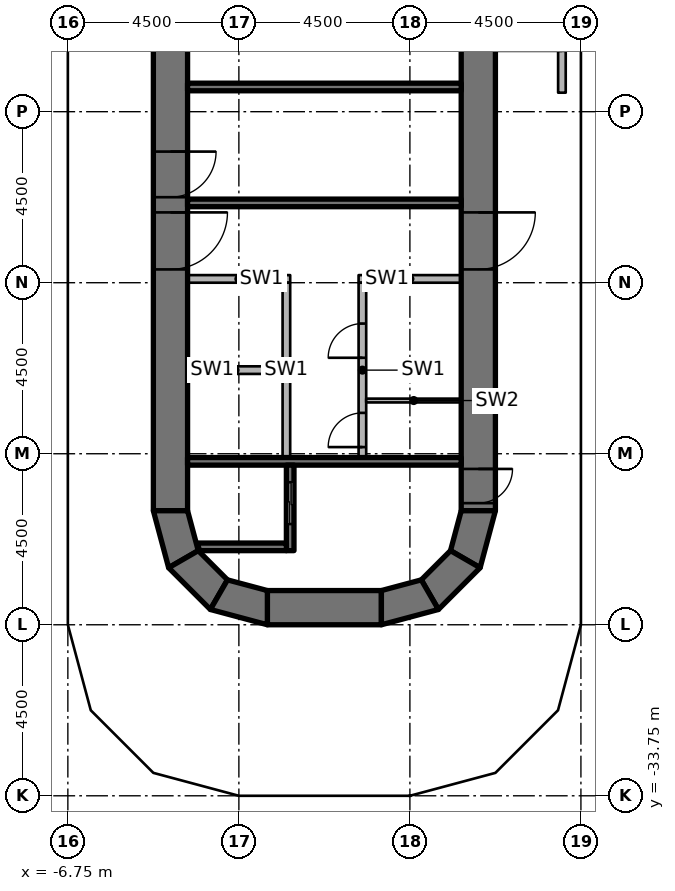
"""IFC4 building model, lengths in metres.
Left out: names, types, materials, properties, quantities, classifications, styles, units other than length and angle.
Written with IfcOpenShell. Run it as: python <this file> out.ifc"""

import sys

from ifc_helpers import new_model, si_unit, direction, frame, frame_2d, origin, origin_2d, place, context, subcontext, project, spatial, polyline, rectangle, outline, extrude, element, fill, save


model = new_model("IFC4")
c1 = context("Model", 3, precision=1e-05, world=origin(), true_north=direction((0.0, 1.0)))
c2 = subcontext(c1, "Body", "Model", "MODEL_VIEW")
j1 = project(units=[si_unit("LENGTHUNIT", "METRE"), si_unit("PLANEANGLEUNIT", "RADIAN")], contexts=[c1])
p1 = place(None, origin())
s1 = spatial("IfcSite", under=j1, at=p1, CompositionType="ELEMENT")
p2 = place(p1, origin())
s2 = spatial("IfcBuilding", under=s1, at=p2, CompositionType="ELEMENT")
p3 = place(p2, frame((0.0, 0.0, 27.0)))
s3 = spatial("IfcBuildingStorey", under=s2, at=p3, CompositionType="ELEMENT", Elevation=27.0)
for number, where, z_axis, x_axis in (
    (1, (-6.25, -26.9, 0.0), (0.0, 0.0, 1.0), (1.0, 0.0, 0.0)),
    (2, (-6.25, -24.65, 0.0), (0.0, 0.0, 1.0), (1.0, 0.0, 0.0)),
    (3, (-6.25, -20.25, 0.0), (0.0, 0.0, 1.0), (1.0, 0.0, 0.0)),
    (4, (-6.25, -15.75, 0.0), (0.0, 0.0, 1.0), (1.0, 0.0, 0.0)),
    (5, (-2.25, -33.11, 0.0), (0.0, 0.0, 1.0), (1.0, 0.0, 0.0)),
    (6, (2.25, -33.11, 0.0), (0.0, 0.0, 1.0), (1.0, 0.0, 0.0)),
    (7, (6.25, -26.9, 0.0), (0.0, 0.0, 1.0), (1.0, 0.0, 0.0)),
    (8, (6.25, -24.65, 0.0), (0.0, 0.0, 1.0), (1.0, 0.0, 0.0)),
    (9, (6.25, -20.25, 0.0), (0.0, 0.0, 1.0), (1.0, 0.0, 0.0)),
    (10, (6.25, -15.75, 0.0), (0.0, 0.0, 1.0), (1.0, 0.0, 0.0)),
):
    element("IfcColumn", number, at=place(p3, frame(where, z_axis=z_axis, x_axis=x_axis)), inside=s3, PredefinedType="COLUMN", context=c2, shape_type="SweptSolid", body=[
        extrude(rectangle(XDim=1.0, YDim=1.0, at=origin_2d()), origin(), (0.0, 0.0, 1.0), 4.05),
    ])
p4 = place(p3, frame((-4.05, -11.25, 0.0), z_axis=(0.0, 0.0, 1.0), x_axis=(0.0, -1.0, 0.0)))
e11 = element("IfcWall", 11, at=p4, inside=s3, PredefinedType="SHEAR", context=c2, shape_type="SweptSolid", body=[
    extrude(rectangle(XDim=15.0, YDim=0.9, at=frame_2d((7.5, 0.0))), origin(), (0.0, 0.0, 1.0), 4.2),
])
p5 = place(p4, frame((7.15, 0.0, 0.0)))
e12 = element("IfcOpeningElement", 12, at=p5, cuts=e11, PredefinedType="OPENING", context=c2, shape_type="SweptSolid", body=[
    extrude(rectangle(XDim=1.5, YDim=2.3, at=frame_2d((0.75, 1.15))), frame((0.0, 0.46, 0.0), z_axis=(0.0, -1.0, 0.0), x_axis=(1.0, 0.0, 0.0)), (0.0, 0.0, 1.0), 0.92),
])
p6 = place(p4, frame((5.55, 0.0, 0.0)))
e13 = element("IfcOpeningElement", 13, at=p6, cuts=e11, PredefinedType="OPENING", context=c2, shape_type="SweptSolid", body=[
    extrude(rectangle(XDim=1.2, YDim=2.1, at=frame_2d((0.6, 1.05))), frame((0.0, 0.46, 0.0), z_axis=(0.0, -1.0, 0.0), x_axis=(1.0, 0.0, 0.0)), (0.0, 0.0, 1.0), 0.92),
])
p7 = place(p3, frame((4.05, -11.25, 0.0), z_axis=(0.0, 0.0, 1.0), x_axis=(0.0, -1.0, 0.0)))
e14 = element("IfcWall", 14, at=p7, inside=s3, PredefinedType="SHEAR", context=c2, shape_type="SweptSolid", body=[
    extrude(rectangle(XDim=15.0, YDim=0.9, at=frame_2d((7.5, 0.0))), origin(), (0.0, 0.0, 1.0), 4.2),
])
p8 = place(p7, frame((7.15, 0.0, 0.0)))
e15 = element("IfcOpeningElement", 15, at=p8, cuts=e14, PredefinedType="OPENING", context=c2, shape_type="SweptSolid", body=[
    extrude(rectangle(XDim=1.5, YDim=2.3, at=frame_2d((0.75, 1.15))), frame((0.0, 0.46, 0.0), z_axis=(0.0, -1.0, 0.0), x_axis=(1.0, 0.0, 0.0)), (0.0, 0.0, 1.0), 0.92),
])
p9 = place(p7, frame((13.9, 0.0, 0.0)))
e16 = element("IfcOpeningElement", 16, at=p9, cuts=e14, PredefinedType="OPENING", context=c2, shape_type="SweptSolid", body=[
    extrude(rectangle(XDim=0.9, YDim=2.1, at=frame_2d((0.45, 1.05))), frame((0.0, 0.46, 0.0), z_axis=(0.0, -1.0, 0.0), x_axis=(1.0, 0.0, 0.0)), (0.0, 0.0, 1.0), 0.92),
])
p10 = place(p7, frame((1.15, 0.0, 0.0)))
e17 = element("IfcOpeningElement", 17, at=p10, cuts=e14, PredefinedType="OPENING", context=c2, shape_type="SweptSolid", body=[
    extrude(rectangle(XDim=1.2, YDim=2.1, at=frame_2d((0.6, 1.05))), frame((0.0, 0.46, 0.0), z_axis=(0.0, -1.0, 0.0), x_axis=(1.0, 0.0, 0.0)), (0.0, 0.0, 1.0), 0.92),
])
p11 = place(p3, frame((-1.5, -28.8, 0.0), z_axis=(0.0, 0.0, 1.0), x_axis=(1.0, 0.0, 0.0)))
e18 = element("IfcWall", 18, at=p11, inside=s3, PredefinedType="SHEAR", context=c2, shape_type="SweptSolid", body=[
    extrude(rectangle(XDim=3.0, YDim=0.9, at=frame_2d((1.5, 0.0))), origin(), (0.0, 0.0, 1.0), 4.2),
])
p12 = place(p3, origin())
e19 = element("IfcWall", 19, at=p12, inside=s3, PredefinedType="SHEAR", context=c2, shape_type="SweptSolid", body=[
    extrude(outline(polyline([(-4.5, -26.25), (-4.098, -27.75), (-3.319, -27.3), (-3.6, -26.25), (-4.5, -26.25)])), origin(), (0.0, 0.0, 1.0), 4.2),
])
p13 = place(p3, origin())
e20 = element("IfcWall", 20, at=p13, inside=s3, PredefinedType="SHEAR", context=c2, shape_type="SweptSolid", body=[
    extrude(outline(polyline([(-4.098, -27.75), (-3.0, -28.848), (-2.55, -28.069), (-3.319, -27.3), (-4.098, -27.75)])), origin(), (0.0, 0.0, 1.0), 4.2),
])
p14 = place(p3, origin())
e21 = element("IfcWall", 21, at=p14, inside=s3, PredefinedType="SHEAR", context=c2, shape_type="SweptSolid", body=[
    extrude(outline(polyline([(-3.0, -28.848), (-1.5, -29.25), (-1.5, -28.35), (-2.55, -28.069), (-3.0, -28.848)])), origin(), (0.0, 0.0, 1.0), 4.2),
])
p15 = place(p3, origin())
e22 = element("IfcWall", 22, at=p15, inside=s3, PredefinedType="SHEAR", context=c2, shape_type="SweptSolid", body=[
    extrude(outline(polyline([(4.5, -26.25), (4.098, -27.75), (3.319, -27.3), (3.6, -26.25), (4.5, -26.25)])), origin(), (0.0, 0.0, 1.0), 4.2),
])
p16 = place(p3, origin())
e23 = element("IfcWall", 23, at=p16, inside=s3, PredefinedType="SHEAR", context=c2, shape_type="SweptSolid", body=[
    extrude(outline(polyline([(4.098, -27.75), (3.0, -28.848), (2.55, -28.069), (3.319, -27.3), (4.098, -27.75)])), origin(), (0.0, 0.0, 1.0), 4.2),
])
p17 = place(p3, origin())
e24 = element("IfcWall", 24, at=p17, inside=s3, PredefinedType="SHEAR", context=c2, shape_type="SweptSolid", body=[
    extrude(outline(polyline([(3.0, -28.848), (1.5, -29.25), (1.5, -28.35), (2.55, -28.069), (3.0, -28.848)])), origin(), (0.0, 0.0, 1.0), 4.2),
])
p18 = place(p3, frame((6.25, -15.25, 0.0), z_axis=(0.0, 0.0, 1.0), x_axis=(0.0, 1.0, 0.0)))
e25 = element("IfcWall", 25, at=p18, inside=s3, PredefinedType="SOLIDWALL", context=c2, shape_type="SweptSolid", body=[
    extrude(rectangle(XDim=4.0, YDim=0.2, at=frame_2d((2.0, 0.0))), origin(), (0.0, 0.0, 1.0), 3.15),
])
p19 = place(p18, frame((1.1, 0.0, 0.0)))
e26 = element("IfcOpeningElement", 26, at=p19, cuts=e25, PredefinedType="OPENING", context=c2, shape_type="SweptSolid", body=[
    extrude(rectangle(XDim=1.8, YDim=2.4, at=frame_2d((0.9, 1.2))), frame((0.0, 0.11, 0.0), z_axis=(0.0, -1.0, 0.0), x_axis=(1.0, 0.0, 0.0)), (0.0, 0.0, 1.0), 0.22),
])
p20 = place(p3, frame((3.6, -24.95, 0.0), z_axis=(0.0, 0.0, 1.0), x_axis=(-1.0, 0.0, 0.0)))
e27 = element("IfcWall", 27, at=p20, inside=s3, PredefinedType="SHEAR", context=c2, shape_type="SweptSolid", body=[
    extrude(rectangle(XDim=7.2, YDim=0.2, at=frame_2d((3.6, 0.0))), origin(), (0.0, 0.0, 1.0), 4.05),
])
p21 = place(p3, frame((-0.9, -27.3, 0.0), z_axis=(0.0, 0.0, 1.0), x_axis=(0.0, 1.0, 0.0)))
e28 = element("IfcWall", 28, at=p21, inside=s3, PredefinedType="SHEAR", context=c2, shape_type="SweptSolid", body=[
    extrude(rectangle(XDim=2.25, YDim=0.2, at=frame_2d((1.125, 0.0))), origin(), (0.0, 0.0, 1.0), 4.05),
])
p22 = place(p21, frame((0.7, 0.0, 0.0)))
e29 = element("IfcOpeningElement", 29, at=p22, cuts=e28, PredefinedType="OPENING", context=c2, shape_type="SweptSolid", body=[
    extrude(rectangle(XDim=1.1, YDim=2.3, at=frame_2d((0.55, 1.15))), frame((0.0, 0.11, 0.0), z_axis=(0.0, -1.0, 0.0), x_axis=(1.0, 0.0, 0.0)), (0.0, 0.0, 1.0), 0.22),
])
p23 = place(p3, origin())
e30 = element("IfcWall", 30, at=p23, inside=s3, PredefinedType="SHEAR", context=c2, shape_type="SweptSolid", body=[
    extrude(outline(polyline([(-1.0, -27.1), (-3.341, -27.1), (-3.291, -27.284), (-3.275, -27.3), (-1.0, -27.3), (-1.0, -27.1)])), origin(), (0.0, 0.0, 1.0), 4.05),
])
for number, where, z_axis, x_axis in (
    (31, (3.6, -18.15, 0.0), (0.0, 0.0, 1.0), (-1.0, 0.0, 0.0)),
    (32, (3.6, -15.1, 0.0), (0.0, 0.0, 1.0), (-1.0, 0.0, 0.0)),
):
    element("IfcWall", number, at=place(p3, frame(where, z_axis=z_axis, x_axis=x_axis)), inside=s3, PredefinedType="SHEAR", context=c2, shape_type="SweptSolid", body=[
        extrude(rectangle(XDim=7.2, YDim=0.2, at=frame_2d((3.6, 0.0))), origin(), (0.0, 0.0, 1.0), 4.05),
    ])
p24 = place(p3, frame((3.6, -20.15, 0.0), z_axis=(0.0, 0.0, 1.0), x_axis=(-1.0, 0.0, 0.0)))
e33 = element("IfcWall", 33, at=p24, inside=s3, PredefinedType="PARTITIONING", context=c2, shape_type="SweptSolid", body=[
    extrude(rectangle(XDim=2.7, YDim=0.2, at=frame_2d((1.35, 0.0))), origin(), (0.0, 0.0, 1.0), 4.05),
])
p25 = place(p3, frame((1.0, -24.85, 0.0), z_axis=(0.0, 0.0, 1.0), x_axis=(0.0, 1.0, 0.0)))
e34 = element("IfcWall", 34, at=p25, inside=s3, PredefinedType="PARTITIONING", context=c2, shape_type="SweptSolid", body=[
    extrude(rectangle(XDim=4.6, YDim=0.2, at=frame_2d((2.3, 0.0))), origin(), (0.0, 0.0, 1.0), 4.05),
])
p26 = place(p25, frame((0.275, 0.0, 0.0)))
e35 = element("IfcOpeningElement", 35, at=p26, cuts=e34, PredefinedType="OPENING", context=c2, shape_type="SweptSolid", body=[
    extrude(rectangle(XDim=0.9, YDim=2.1, at=frame_2d((0.45, 1.05))), frame((0.0, 0.11, 0.0), z_axis=(0.0, -1.0, 0.0), x_axis=(1.0, 0.0, 0.0)), (0.0, 0.0, 1.0), 0.22),
])
p27 = place(p25, frame((2.625, 0.0, 0.0)))
e36 = element("IfcOpeningElement", 36, at=p27, cuts=e34, PredefinedType="OPENING", context=c2, shape_type="SweptSolid", body=[
    extrude(rectangle(XDim=0.9, YDim=2.1, at=frame_2d((0.45, 1.05))), frame((0.0, 0.11, 0.0), z_axis=(0.0, -1.0, 0.0), x_axis=(1.0, 0.0, 0.0)), (0.0, 0.0, 1.0), 0.22),
])
p28 = place(p3, frame((-0.9, -20.15, 0.0), z_axis=(0.0, 0.0, 1.0), x_axis=(-1.0, 0.0, 0.0)))
e37 = element("IfcWall", 37, at=p28, inside=s3, PredefinedType="PARTITIONING", context=c2, shape_type="SweptSolid", body=[
    extrude(rectangle(XDim=2.7, YDim=0.2, at=frame_2d((1.35, 0.0))), origin(), (0.0, 0.0, 1.0), 4.05),
])
p29 = place(p3, frame((-1.0, -24.85, 0.0), z_axis=(0.0, 0.0, 1.0), x_axis=(0.0, 1.0, 0.0)))
e38 = element("IfcWall", 38, at=p29, inside=s3, PredefinedType="PARTITIONING", context=c2, shape_type="SweptSolid", body=[
    extrude(rectangle(XDim=4.6, YDim=0.2, at=frame_2d((2.3, 0.0))), origin(), (0.0, 0.0, 1.0), 4.05),
])
p30 = place(p3, frame((3.6, -23.35, 0.0), z_axis=(0.0, 0.0, 1.0), x_axis=(-1.0, 0.0, 0.0)))
e39 = element("IfcWall", 39, at=p30, inside=s3, PredefinedType="PARTITIONING", context=c2, shape_type="SweptSolid", body=[
    extrude(rectangle(XDim=2.5, YDim=0.1, at=frame_2d((1.25, 0.0))), origin(), (0.0, 0.0, 1.0), 4.05),
])
p31 = place(p3, frame((-1.1, -22.55, 0.0), z_axis=(0.0, 0.0, 1.0), x_axis=(-1.0, 0.0, 0.0)))
e40 = element("IfcWall", 40, at=p31, inside=s3, PredefinedType="PARTITIONING", context=c2, shape_type="SweptSolid", body=[
    extrude(rectangle(XDim=2.5, YDim=0.2, at=frame_2d((1.25, 0.0))), origin(), (0.0, 0.0, 1.0), 4.05),
])
p32 = place(p8, origin())
e41 = element("IfcDoor", 41, at=p32, inside=s3, OperationType="DOUBLE_DOOR_SINGLE_SWING", PredefinedType="DOOR", context=c2, shape_type="SweptSolid", body=[
    extrude(rectangle(XDim=1.5, YDim=2.3, at=frame_2d((0.75, 1.15))), frame((0.0, 0.025, 0.0), z_axis=(0.0, -1.0, 0.0), x_axis=(1.0, 0.0, 0.0)), (0.0, 0.0, 1.0), 0.05),
])
fill(e15, e41)
p33 = place(p5, origin())
e42 = element("IfcDoor", 42, at=p33, inside=s3, OperationType="DOUBLE_DOOR_SINGLE_SWING", PredefinedType="DOOR", context=c2, shape_type="SweptSolid", body=[
    extrude(rectangle(XDim=1.5, YDim=2.3, at=frame_2d((0.75, 1.15))), frame((0.0, 0.025, 0.0), z_axis=(0.0, -1.0, 0.0), x_axis=(1.0, 0.0, 0.0)), (0.0, 0.0, 1.0), 0.05),
])
fill(e12, e42)
p34 = place(p9, origin())
e43 = element("IfcDoor", 43, at=p34, inside=s3, OperationType="SINGLE_SWING_LEFT", PredefinedType="DOOR", context=c2, shape_type="SweptSolid", body=[
    extrude(rectangle(XDim=0.9, YDim=2.1, at=frame_2d((0.45, 1.05))), frame((0.0, 0.025, 0.0), z_axis=(0.0, -1.0, 0.0), x_axis=(1.0, 0.0, 0.0)), (0.0, 0.0, 1.0), 0.05),
])
fill(e16, e43)
p35 = place(p6, origin())
e44 = element("IfcDoor", 44, at=p35, inside=s3, OperationType="SINGLE_SWING_RIGHT", PredefinedType="DOOR", context=c2, shape_type="SweptSolid", body=[
    extrude(rectangle(XDim=1.2, YDim=2.1, at=frame_2d((0.6, 1.05))), frame((0.0, 0.025, 0.0), z_axis=(0.0, -1.0, 0.0), x_axis=(1.0, 0.0, 0.0)), (0.0, 0.0, 1.0), 0.05),
])
fill(e13, e44)
p36 = place(p22, origin())
e45 = element("IfcDoor", 45, at=p36, inside=s3, OperationType="DOUBLE_DOOR_SLIDING", PredefinedType="DOOR", context=c2, shape_type="SweptSolid", body=[
    extrude(rectangle(XDim=1.1, YDim=2.3, at=frame_2d((0.55, 1.15))), frame((0.0, 0.025, 0.0), z_axis=(0.0, -1.0, 0.0), x_axis=(1.0, 0.0, 0.0)), (0.0, 0.0, 1.0), 0.05),
])
fill(e29, e45)
p37 = place(p26, origin())
e46 = element("IfcDoor", 46, at=p37, inside=s3, OperationType="SINGLE_SWING_LEFT", PredefinedType="DOOR", context=c2, shape_type="SweptSolid", body=[
    extrude(rectangle(XDim=0.9, YDim=2.1, at=frame_2d((0.45, 1.05))), frame((0.0, 0.025, 0.0), z_axis=(0.0, -1.0, 0.0), x_axis=(1.0, 0.0, 0.0)), (0.0, 0.0, 1.0), 0.05),
])
fill(e35, e46)
p38 = place(p27, origin())
e47 = element("IfcDoor", 47, at=p38, inside=s3, OperationType="SINGLE_SWING_LEFT", PredefinedType="DOOR", context=c2, shape_type="SweptSolid", body=[
    extrude(rectangle(XDim=0.9, YDim=2.1, at=frame_2d((0.45, 1.05))), frame((0.0, 0.025, 0.0), z_axis=(0.0, -1.0, 0.0), x_axis=(1.0, 0.0, 0.0)), (0.0, 0.0, 1.0), 0.05),
])
fill(e36, e47)
save(model, sys.argv[1])
